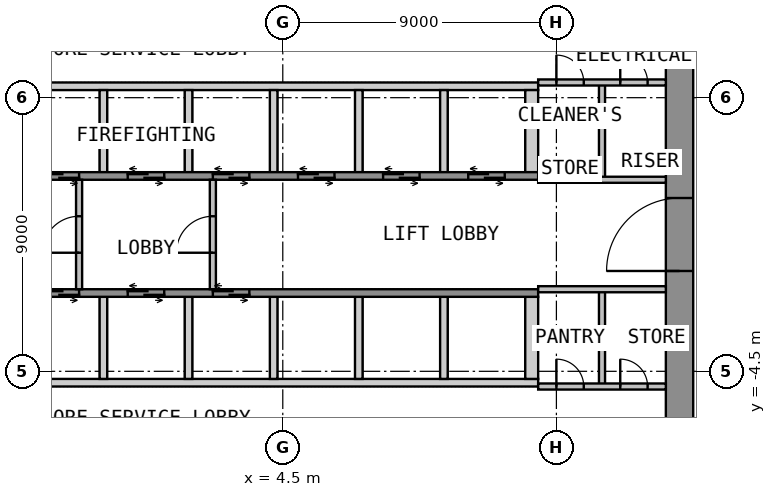
"""IFC4 building model, lengths in metres.
Left out: names, types, materials, properties, quantities, classifications, styles, units other than length and angle.
Written with IfcOpenShell. Run it as: python <this file> out.ifc"""

import sys

from ifc_helpers import new_model, si_unit, direction, frame, frame_2d, origin, place, context, subcontext, project, spatial, polyline, rectangle, outline, extrude, element, fill, save


model = new_model("IFC4")
c1 = context("Model", 3, precision=1e-05, world=origin(), true_north=direction((0.0, 1.0)))
c2 = subcontext(c1, "Body", "Model", "MODEL_VIEW")
j1 = project(units=[si_unit("LENGTHUNIT", "METRE"), si_unit("PLANEANGLEUNIT", "RADIAN")], contexts=[c1])
p1 = place(None, origin())
s1 = spatial("IfcSite", under=j1, at=p1, CompositionType="ELEMENT")
p2 = place(p1, origin())
s2 = spatial("IfcBuilding", under=s1, at=p2, CompositionType="ELEMENT")
p3 = place(p2, frame((0.0, 0.0, 6.0)))
s3 = spatial("IfcBuildingStorey", under=s2, at=p3, CompositionType="ELEMENT", Elevation=6.0)
p4 = place(p3, frame((17.55, -12.6, 0.0), z_axis=(0.0, 0.0, 1.0), x_axis=(0.0, 1.0, 0.0)))
e1 = element("IfcWall", 1, at=p4, inside=s3, PredefinedType="SHEAR", context=c2, shape_type="SweptSolid", body=[
    extrude(rectangle(XDim=25.2, YDim=0.9, at=frame_2d((12.6, 0.0))), origin(), (0.0, 0.0, 1.0), 4.4),
])
p5 = place(p4, frame((11.4, 0.0, 0.0)))
e2 = element("IfcOpeningElement", 2, at=p5, cuts=e1, PredefinedType="OPENING", context=c2, shape_type="SweptSolid", body=[
    extrude(rectangle(XDim=2.4, YDim=2.1, at=frame_2d((1.2, 1.05))), frame((0.0, 0.46, 0.0), z_axis=(0.0, -1.0, 0.0), x_axis=(1.0, 0.0, 0.0)), (0.0, 0.0, 1.0), 0.92),
])
p6 = place(p3, origin())
e3 = element("IfcWall", 3, at=p6, inside=s3, PredefinedType="SHEAR", context=c2, shape_type="SweptSolid", body=[
    extrude(outline(polyline([(-12.9, 4.75), (12.9, 4.75), (12.9, 5.0), (-12.9, 5.0), (-12.9, 4.75)])), origin(), (0.0, 0.0, 1.0), 4.4),
])
p7 = place(p3, origin())
e4 = element("IfcWall", 4, at=p7, inside=s3, PredefinedType="SHEAR", context=c2, shape_type="SweptSolid", body=[
    extrude(outline(polyline([(-1.525, 2.05), (-1.275, 2.05), (-1.275, 4.75), (-1.525, 4.75), (-1.525, 2.05)])), origin(), (0.0, 0.0, 1.0), 4.4),
])
p8 = place(p3, origin())
e5 = element("IfcWall", 5, at=p8, inside=s3, PredefinedType="SHEAR", context=c2, shape_type="SweptSolid", body=[
    extrude(outline(polyline([(1.275, 2.05), (1.525, 2.05), (1.525, 4.75), (1.275, 4.75), (1.275, 2.05)])), origin(), (0.0, 0.0, 1.0), 4.4),
])
p9 = place(p3, origin())
e6 = element("IfcWall", 6, at=p9, inside=s3, PredefinedType="SHEAR", context=c2, shape_type="SweptSolid", body=[
    extrude(outline(polyline([(4.075, 2.05), (4.325, 2.05), (4.325, 4.75), (4.075, 4.75), (4.075, 2.05)])), origin(), (0.0, 0.0, 1.0), 4.4),
])
p10 = place(p3, origin())
e7 = element("IfcWall", 7, at=p10, inside=s3, PredefinedType="SHEAR", context=c2, shape_type="SweptSolid", body=[
    extrude(outline(polyline([(6.875, 2.05), (7.125, 2.05), (7.125, 4.75), (6.875, 4.75), (6.875, 2.05)])), origin(), (0.0, 0.0, 1.0), 4.4),
])
p11 = place(p3, origin())
e8 = element("IfcWall", 8, at=p11, inside=s3, PredefinedType="SHEAR", context=c2, shape_type="SweptSolid", body=[
    extrude(outline(polyline([(9.675, 2.05), (9.925, 2.05), (9.925, 4.75), (9.675, 4.75), (9.675, 2.05)])), origin(), (0.0, 0.0, 1.0), 4.4),
])
p12 = place(p3, origin())
e9 = element("IfcWall", 9, at=p12, inside=s3, PredefinedType="SHEAR", context=c2, shape_type="SweptSolid", body=[
    extrude(outline(polyline([(12.475, 2.05), (12.9, 2.05), (12.9, 4.75), (12.475, 4.75), (12.475, 2.05)])), origin(), (0.0, 0.0, 1.0), 4.4),
])
p13 = place(p3, frame((-12.9, 1.925, 0.0), z_axis=(0.0, 0.0, 1.0), x_axis=(1.0, 0.0, 0.0)))
e10 = element("IfcWall", 10, at=p13, inside=s3, PredefinedType="SHEAR", context=c2, shape_type="SweptSolid", body=[
    extrude(rectangle(XDim=25.8, YDim=0.25, at=frame_2d((12.9, 0.0))), origin(), (0.0, 0.0, 1.0), 4.4),
])
p14 = place(p13, frame((9.5, 0.0, 0.0)))
e11 = element("IfcOpeningElement", 11, at=p14, cuts=e10, PredefinedType="OPENING", context=c2, shape_type="SweptSolid", body=[
    extrude(rectangle(XDim=1.2, YDim=2.1, at=frame_2d((0.6, 1.05))), frame((0.0, 0.135, 0.0), z_axis=(0.0, -1.0, 0.0), x_axis=(1.0, 0.0, 0.0)), (0.0, 0.0, 1.0), 0.27),
])
p15 = place(p13, frame((12.3, 0.0, 0.0)))
e12 = element("IfcOpeningElement", 12, at=p15, cuts=e10, PredefinedType="OPENING", context=c2, shape_type="SweptSolid", body=[
    extrude(rectangle(XDim=1.2, YDim=2.1, at=frame_2d((0.6, 1.05))), frame((0.0, 0.135, 0.0), z_axis=(0.0, -1.0, 0.0), x_axis=(1.0, 0.0, 0.0)), (0.0, 0.0, 1.0), 0.27),
])
p16 = place(p13, frame((15.1, 0.0, 0.0)))
e13 = element("IfcOpeningElement", 13, at=p16, cuts=e10, PredefinedType="OPENING", context=c2, shape_type="SweptSolid", body=[
    extrude(rectangle(XDim=1.2, YDim=2.1, at=frame_2d((0.6, 1.05))), frame((0.0, 0.135, 0.0), z_axis=(0.0, -1.0, 0.0), x_axis=(1.0, 0.0, 0.0)), (0.0, 0.0, 1.0), 0.27),
])
p17 = place(p13, frame((17.9, 0.0, 0.0)))
e14 = element("IfcOpeningElement", 14, at=p17, cuts=e10, PredefinedType="OPENING", context=c2, shape_type="SweptSolid", body=[
    extrude(rectangle(XDim=1.2, YDim=2.1, at=frame_2d((0.6, 1.05))), frame((0.0, 0.135, 0.0), z_axis=(0.0, -1.0, 0.0), x_axis=(1.0, 0.0, 0.0)), (0.0, 0.0, 1.0), 0.27),
])
p18 = place(p13, frame((20.7, 0.0, 0.0)))
e15 = element("IfcOpeningElement", 15, at=p18, cuts=e10, PredefinedType="OPENING", context=c2, shape_type="SweptSolid", body=[
    extrude(rectangle(XDim=1.2, YDim=2.1, at=frame_2d((0.6, 1.05))), frame((0.0, 0.135, 0.0), z_axis=(0.0, -1.0, 0.0), x_axis=(1.0, 0.0, 0.0)), (0.0, 0.0, 1.0), 0.27),
])
p19 = place(p13, frame((23.5, 0.0, 0.0)))
e16 = element("IfcOpeningElement", 16, at=p19, cuts=e10, PredefinedType="OPENING", context=c2, shape_type="SweptSolid", body=[
    extrude(rectangle(XDim=1.2, YDim=2.1, at=frame_2d((0.6, 1.05))), frame((0.0, 0.135, 0.0), z_axis=(0.0, -1.0, 0.0), x_axis=(1.0, 0.0, 0.0)), (0.0, 0.0, 1.0), 0.27),
])
p20 = place(p3, origin())
e17 = element("IfcWall", 17, at=p20, inside=s3, PredefinedType="SHEAR", context=c2, shape_type="SweptSolid", body=[
    extrude(outline(polyline([(-12.9, -5.0), (12.9, -5.0), (12.9, -4.75), (-12.9, -4.75), (-12.9, -5.0)])), origin(), (0.0, 0.0, 1.0), 4.4),
])
p21 = place(p3, origin())
e18 = element("IfcWall", 18, at=p21, inside=s3, PredefinedType="SHEAR", context=c2, shape_type="SweptSolid", body=[
    extrude(outline(polyline([(-1.525, -4.75), (-1.275, -4.75), (-1.275, -2.05), (-1.525, -2.05), (-1.525, -4.75)])), origin(), (0.0, 0.0, 1.0), 4.4),
])
p22 = place(p3, origin())
e19 = element("IfcWall", 19, at=p22, inside=s3, PredefinedType="SHEAR", context=c2, shape_type="SweptSolid", body=[
    extrude(outline(polyline([(1.275, -4.75), (1.525, -4.75), (1.525, -2.05), (1.275, -2.05), (1.275, -4.75)])), origin(), (0.0, 0.0, 1.0), 4.4),
])
p23 = place(p3, origin())
e20 = element("IfcWall", 20, at=p23, inside=s3, PredefinedType="SHEAR", context=c2, shape_type="SweptSolid", body=[
    extrude(outline(polyline([(4.075, -4.75), (4.325, -4.75), (4.325, -2.05), (4.075, -2.05), (4.075, -4.75)])), origin(), (0.0, 0.0, 1.0), 4.4),
])
p24 = place(p3, origin())
e21 = element("IfcWall", 21, at=p24, inside=s3, PredefinedType="SHEAR", context=c2, shape_type="SweptSolid", body=[
    extrude(outline(polyline([(6.875, -4.75), (7.125, -4.75), (7.125, -2.05), (6.875, -2.05), (6.875, -4.75)])), origin(), (0.0, 0.0, 1.0), 4.4),
])
p25 = place(p3, origin())
e22 = element("IfcWall", 22, at=p25, inside=s3, PredefinedType="SHEAR", context=c2, shape_type="SweptSolid", body=[
    extrude(outline(polyline([(9.675, -4.75), (9.925, -4.75), (9.925, -2.05), (9.675, -2.05), (9.675, -4.75)])), origin(), (0.0, 0.0, 1.0), 4.4),
])
p26 = place(p3, origin())
e23 = element("IfcWall", 23, at=p26, inside=s3, PredefinedType="SHEAR", context=c2, shape_type="SweptSolid", body=[
    extrude(outline(polyline([(12.475, -4.75), (12.9, -4.75), (12.9, -2.05), (12.475, -2.05), (12.475, -4.75)])), origin(), (0.0, 0.0, 1.0), 4.4),
])
p27 = place(p3, frame((-12.9, -1.925, 0.0), z_axis=(0.0, 0.0, 1.0), x_axis=(1.0, 0.0, 0.0)))
e24 = element("IfcWall", 24, at=p27, inside=s3, PredefinedType="SHEAR", context=c2, shape_type="SweptSolid", body=[
    extrude(rectangle(XDim=25.8, YDim=0.25, at=frame_2d((12.9, 0.0))), origin(), (0.0, 0.0, 1.0), 4.4),
])
p28 = place(p27, frame((1.1, 0.0, 0.0)))
e25 = element("IfcOpeningElement", 25, at=p28, cuts=e24, PredefinedType="OPENING", context=c2, shape_type="SweptSolid", body=[
    extrude(rectangle(XDim=1.2, YDim=2.1, at=frame_2d((0.6, 1.05))), frame((0.0, 0.135, 0.0), z_axis=(0.0, -1.0, 0.0), x_axis=(1.0, 0.0, 0.0)), (0.0, 0.0, 1.0), 0.27),
])
p29 = place(p27, frame((3.9, 0.0, 0.0)))
e26 = element("IfcOpeningElement", 26, at=p29, cuts=e24, PredefinedType="OPENING", context=c2, shape_type="SweptSolid", body=[
    extrude(rectangle(XDim=1.2, YDim=2.1, at=frame_2d((0.6, 1.05))), frame((0.0, 0.135, 0.0), z_axis=(0.0, -1.0, 0.0), x_axis=(1.0, 0.0, 0.0)), (0.0, 0.0, 1.0), 0.27),
])
p30 = place(p27, frame((6.7, 0.0, 0.0)))
e27 = element("IfcOpeningElement", 27, at=p30, cuts=e24, PredefinedType="OPENING", context=c2, shape_type="SweptSolid", body=[
    extrude(rectangle(XDim=1.2, YDim=2.1, at=frame_2d((0.6, 1.05))), frame((0.0, 0.135, 0.0), z_axis=(0.0, -1.0, 0.0), x_axis=(1.0, 0.0, 0.0)), (0.0, 0.0, 1.0), 0.27),
])
p31 = place(p27, frame((9.5, 0.0, 0.0)))
e28 = element("IfcOpeningElement", 28, at=p31, cuts=e24, PredefinedType="OPENING", context=c2, shape_type="SweptSolid", body=[
    extrude(rectangle(XDim=1.2, YDim=2.1, at=frame_2d((0.6, 1.05))), frame((0.0, 0.135, 0.0), z_axis=(0.0, -1.0, 0.0), x_axis=(1.0, 0.0, 0.0)), (0.0, 0.0, 1.0), 0.27),
])
p32 = place(p27, frame((12.3, 0.0, 0.0)))
e29 = element("IfcOpeningElement", 29, at=p32, cuts=e24, PredefinedType="OPENING", context=c2, shape_type="SweptSolid", body=[
    extrude(rectangle(XDim=1.2, YDim=2.1, at=frame_2d((0.6, 1.05))), frame((0.0, 0.135, 0.0), z_axis=(0.0, -1.0, 0.0), x_axis=(1.0, 0.0, 0.0)), (0.0, 0.0, 1.0), 0.27),
])
p33 = place(p27, frame((15.1, 0.0, 0.0)))
e30 = element("IfcOpeningElement", 30, at=p33, cuts=e24, PredefinedType="OPENING", context=c2, shape_type="SweptSolid", body=[
    extrude(rectangle(XDim=1.2, YDim=2.1, at=frame_2d((0.6, 1.05))), frame((0.0, 0.135, 0.0), z_axis=(0.0, -1.0, 0.0), x_axis=(1.0, 0.0, 0.0)), (0.0, 0.0, 1.0), 0.27),
])
p34 = place(p3, frame((-2.2, -1.8, 0.0), z_axis=(0.0, 0.0, 1.0), x_axis=(0.0, 1.0, 0.0)))
e31 = element("IfcWall", 31, at=p34, inside=s3, PredefinedType="PARTITIONING", context=c2, shape_type="SweptSolid", body=[
    extrude(rectangle(XDim=3.6, YDim=0.2, at=frame_2d((1.8, 0.0))), origin(), (0.0, 0.0, 1.0), 4.4),
])
p35 = place(p34, frame((1.2, 0.0, 0.0)))
e32 = element("IfcOpeningElement", 32, at=p35, cuts=e31, PredefinedType="OPENING", context=c2, shape_type="SweptSolid", body=[
    extrude(rectangle(XDim=1.2, YDim=2.1, at=frame_2d((0.6, 1.05))), frame((0.0, 0.11, 0.0), z_axis=(0.0, -1.0, 0.0), x_axis=(1.0, 0.0, 0.0)), (0.0, 0.0, 1.0), 0.22),
])
p36 = place(p3, frame((2.2, -1.8, 0.0), z_axis=(0.0, 0.0, 1.0), x_axis=(0.0, 1.0, 0.0)))
e33 = element("IfcWall", 33, at=p36, inside=s3, PredefinedType="PARTITIONING", context=c2, shape_type="SweptSolid", body=[
    extrude(rectangle(XDim=3.6, YDim=0.2, at=frame_2d((1.8, 0.0))), origin(), (0.0, 0.0, 1.0), 4.4),
])
p37 = place(p36, frame((1.2, 0.0, 0.0)))
e34 = element("IfcOpeningElement", 34, at=p37, cuts=e33, PredefinedType="OPENING", context=c2, shape_type="SweptSolid", body=[
    extrude(rectangle(XDim=1.2, YDim=2.1, at=frame_2d((0.6, 1.05))), frame((0.0, 0.11, 0.0), z_axis=(0.0, -1.0, 0.0), x_axis=(1.0, 0.0, 0.0)), (0.0, 0.0, 1.0), 0.22),
])
p38 = place(p3, frame((15.0, 1.8, 0.0), z_axis=(0.0, 0.0, 1.0), x_axis=(0.0, 1.0, 0.0)))
e35 = element("IfcWall", 35, at=p38, inside=s3, PredefinedType="PARTITIONING", context=c2, shape_type="SweptSolid", body=[
    extrude(rectangle(XDim=3.2, YDim=0.2, at=frame_2d((1.6, 0.0))), origin(), (0.0, 0.0, 1.0), 4.4),
])
p39 = place(p3, frame((12.9, 5.0, 0.0), z_axis=(0.0, 0.0, 1.0), x_axis=(1.0, 0.0, 0.0)))
e36 = element("IfcWall", 36, at=p39, inside=s3, PredefinedType="PARTITIONING", context=c2, shape_type="SweptSolid", body=[
    extrude(rectangle(XDim=4.2, YDim=0.2, at=frame_2d((2.1, 0.0))), origin(), (0.0, 0.0, 1.0), 4.4),
])
p40 = place(p39, frame((0.6, 0.0, 0.0)))
e37 = element("IfcOpeningElement", 37, at=p40, cuts=e36, PredefinedType="OPENING", context=c2, shape_type="SweptSolid", body=[
    extrude(rectangle(XDim=0.9, YDim=2.1, at=frame_2d((0.45, 1.05))), frame((0.0, 0.11, 0.0), z_axis=(0.0, -1.0, 0.0), x_axis=(1.0, 0.0, 0.0)), (0.0, 0.0, 1.0), 0.22),
])
p41 = place(p39, frame((2.7, 0.0, 0.0)))
e38 = element("IfcOpeningElement", 38, at=p41, cuts=e36, PredefinedType="OPENING", context=c2, shape_type="SweptSolid", body=[
    extrude(rectangle(XDim=0.9, YDim=2.1, at=frame_2d((0.45, 1.05))), frame((0.0, 0.11, 0.0), z_axis=(0.0, -1.0, 0.0), x_axis=(1.0, 0.0, 0.0)), (0.0, 0.0, 1.0), 0.22),
])
p42 = place(p3, frame((12.9, 1.8, 0.0), z_axis=(0.0, 0.0, 1.0), x_axis=(1.0, 0.0, 0.0)))
e39 = element("IfcWall", 39, at=p42, inside=s3, PredefinedType="PARTITIONING", context=c2, shape_type="SweptSolid", body=[
    extrude(rectangle(XDim=4.2, YDim=0.2, at=frame_2d((2.1, 0.0))), origin(), (0.0, 0.0, 1.0), 4.4),
])
p43 = place(p3, frame((15.0, -5.0, 0.0), z_axis=(0.0, 0.0, 1.0), x_axis=(0.0, 1.0, 0.0)))
e40 = element("IfcWall", 40, at=p43, inside=s3, PredefinedType="PARTITIONING", context=c2, shape_type="SweptSolid", body=[
    extrude(rectangle(XDim=3.2, YDim=0.2, at=frame_2d((1.6, 0.0))), origin(), (0.0, 0.0, 1.0), 4.4),
])
p44 = place(p3, frame((12.9, -5.0, 0.0), z_axis=(0.0, 0.0, 1.0), x_axis=(1.0, 0.0, 0.0)))
e41 = element("IfcWall", 41, at=p44, inside=s3, PredefinedType="PARTITIONING", context=c2, shape_type="SweptSolid", body=[
    extrude(rectangle(XDim=4.2, YDim=0.2, at=frame_2d((2.1, 0.0))), origin(), (0.0, 0.0, 1.0), 4.4),
])
p45 = place(p44, frame((0.6, 0.0, 0.0)))
e42 = element("IfcOpeningElement", 42, at=p45, cuts=e41, PredefinedType="OPENING", context=c2, shape_type="SweptSolid", body=[
    extrude(rectangle(XDim=0.9, YDim=2.1, at=frame_2d((0.45, 1.05))), frame((0.0, 0.11, 0.0), z_axis=(0.0, -1.0, 0.0), x_axis=(1.0, 0.0, 0.0)), (0.0, 0.0, 1.0), 0.22),
])
p46 = place(p44, frame((2.7, 0.0, 0.0)))
e43 = element("IfcOpeningElement", 43, at=p46, cuts=e41, PredefinedType="OPENING", context=c2, shape_type="SweptSolid", body=[
    extrude(rectangle(XDim=0.9, YDim=2.1, at=frame_2d((0.45, 1.05))), frame((0.0, 0.11, 0.0), z_axis=(0.0, -1.0, 0.0), x_axis=(1.0, 0.0, 0.0)), (0.0, 0.0, 1.0), 0.22),
])
p47 = place(p3, frame((12.9, -1.8, 0.0), z_axis=(0.0, 0.0, 1.0), x_axis=(1.0, 0.0, 0.0)))
e44 = element("IfcWall", 44, at=p47, inside=s3, PredefinedType="PARTITIONING", context=c2, shape_type="SweptSolid", body=[
    extrude(rectangle(XDim=4.2, YDim=0.2, at=frame_2d((2.1, 0.0))), origin(), (0.0, 0.0, 1.0), 4.4),
])
p48 = place(p5, origin())
e45 = element("IfcDoor", 45, at=p48, inside=s3, OperationType="DOUBLE_DOOR_DOUBLE_SWING", PredefinedType="DOOR", context=c2, shape_type="SweptSolid", body=[
    extrude(rectangle(XDim=2.4, YDim=2.1, at=frame_2d((1.2, 1.05))), frame((0.0, 0.025, 0.0), z_axis=(0.0, -1.0, 0.0), x_axis=(1.0, 0.0, 0.0)), (0.0, 0.0, 1.0), 0.05),
])
fill(e2, e45)
p49 = place(p14, origin())
e46 = element("IfcDoor", 46, at=p49, inside=s3, OperationType="DOUBLE_DOOR_SLIDING", PredefinedType="DOOR", context=c2, shape_type="SweptSolid", body=[
    extrude(rectangle(XDim=1.2, YDim=2.1, at=frame_2d((0.6, 1.05))), frame((0.0, 0.025, 0.0), z_axis=(0.0, -1.0, 0.0), x_axis=(1.0, 0.0, 0.0)), (0.0, 0.0, 1.0), 0.05),
])
fill(e11, e46)
p50 = place(p15, origin())
e47 = element("IfcDoor", 47, at=p50, inside=s3, OperationType="DOUBLE_DOOR_SLIDING", PredefinedType="DOOR", context=c2, shape_type="SweptSolid", body=[
    extrude(rectangle(XDim=1.2, YDim=2.1, at=frame_2d((0.6, 1.05))), frame((0.0, 0.025, 0.0), z_axis=(0.0, -1.0, 0.0), x_axis=(1.0, 0.0, 0.0)), (0.0, 0.0, 1.0), 0.05),
])
fill(e12, e47)
p51 = place(p16, origin())
e48 = element("IfcDoor", 48, at=p51, inside=s3, OperationType="DOUBLE_DOOR_SLIDING", PredefinedType="DOOR", context=c2, shape_type="SweptSolid", body=[
    extrude(rectangle(XDim=1.2, YDim=2.1, at=frame_2d((0.6, 1.05))), frame((0.0, 0.025, 0.0), z_axis=(0.0, -1.0, 0.0), x_axis=(1.0, 0.0, 0.0)), (0.0, 0.0, 1.0), 0.05),
])
fill(e13, e48)
p52 = place(p17, origin())
e49 = element("IfcDoor", 49, at=p52, inside=s3, OperationType="DOUBLE_DOOR_SLIDING", PredefinedType="DOOR", context=c2, shape_type="SweptSolid", body=[
    extrude(rectangle(XDim=1.2, YDim=2.1, at=frame_2d((0.6, 1.05))), frame((0.0, 0.025, 0.0), z_axis=(0.0, -1.0, 0.0), x_axis=(1.0, 0.0, 0.0)), (0.0, 0.0, 1.0), 0.05),
])
fill(e14, e49)
p53 = place(p18, origin())
e50 = element("IfcDoor", 50, at=p53, inside=s3, OperationType="DOUBLE_DOOR_SLIDING", PredefinedType="DOOR", context=c2, shape_type="SweptSolid", body=[
    extrude(rectangle(XDim=1.2, YDim=2.1, at=frame_2d((0.6, 1.05))), frame((0.0, 0.025, 0.0), z_axis=(0.0, -1.0, 0.0), x_axis=(1.0, 0.0, 0.0)), (0.0, 0.0, 1.0), 0.05),
])
fill(e15, e50)
p54 = place(p19, origin())
e51 = element("IfcDoor", 51, at=p54, inside=s3, OperationType="DOUBLE_DOOR_SLIDING", PredefinedType="DOOR", context=c2, shape_type="SweptSolid", body=[
    extrude(rectangle(XDim=1.2, YDim=2.1, at=frame_2d((0.6, 1.05))), frame((0.0, 0.025, 0.0), z_axis=(0.0, -1.0, 0.0), x_axis=(1.0, 0.0, 0.0)), (0.0, 0.0, 1.0), 0.05),
])
fill(e16, e51)
p55 = place(p31, origin())
e52 = element("IfcDoor", 52, at=p55, inside=s3, OperationType="DOUBLE_DOOR_SLIDING", PredefinedType="DOOR", context=c2, shape_type="SweptSolid", body=[
    extrude(rectangle(XDim=1.2, YDim=2.1, at=frame_2d((0.6, 1.05))), frame((0.0, 0.025, 0.0), z_axis=(0.0, -1.0, 0.0), x_axis=(1.0, 0.0, 0.0)), (0.0, 0.0, 1.0), 0.05),
])
fill(e28, e52)
p56 = place(p32, origin())
e53 = element("IfcDoor", 53, at=p56, inside=s3, OperationType="DOUBLE_DOOR_SLIDING", PredefinedType="DOOR", context=c2, shape_type="SweptSolid", body=[
    extrude(rectangle(XDim=1.2, YDim=2.1, at=frame_2d((0.6, 1.05))), frame((0.0, 0.025, 0.0), z_axis=(0.0, -1.0, 0.0), x_axis=(1.0, 0.0, 0.0)), (0.0, 0.0, 1.0), 0.05),
])
fill(e29, e53)
p57 = place(p33, origin())
e54 = element("IfcDoor", 54, at=p57, inside=s3, OperationType="DOUBLE_DOOR_SLIDING", PredefinedType="DOOR", context=c2, shape_type="SweptSolid", body=[
    extrude(rectangle(XDim=1.2, YDim=2.1, at=frame_2d((0.6, 1.05))), frame((0.0, 0.025, 0.0), z_axis=(0.0, -1.0, 0.0), x_axis=(1.0, 0.0, 0.0)), (0.0, 0.0, 1.0), 0.05),
])
fill(e30, e54)
p58 = place(p35, origin())
e55 = element("IfcDoor", 55, at=p58, inside=s3, OperationType="SINGLE_SWING_LEFT", PredefinedType="DOOR", context=c2, shape_type="SweptSolid", body=[
    extrude(rectangle(XDim=1.2, YDim=2.1, at=frame_2d((0.6, 1.05))), frame((0.0, 0.025, 0.0), z_axis=(0.0, -1.0, 0.0), x_axis=(1.0, 0.0, 0.0)), (0.0, 0.0, 1.0), 0.05),
])
fill(e32, e55)
p59 = place(p37, origin())
e56 = element("IfcDoor", 56, at=p59, inside=s3, OperationType="SINGLE_SWING_LEFT", PredefinedType="DOOR", context=c2, shape_type="SweptSolid", body=[
    extrude(rectangle(XDim=1.2, YDim=2.1, at=frame_2d((0.6, 1.05))), frame((0.0, 0.025, 0.0), z_axis=(0.0, -1.0, 0.0), x_axis=(1.0, 0.0, 0.0)), (0.0, 0.0, 1.0), 0.05),
])
fill(e34, e56)
p60 = place(p40, origin())
e57 = element("IfcDoor", 57, at=p60, inside=s3, OperationType="SINGLE_SWING_LEFT", PredefinedType="DOOR", context=c2, shape_type="SweptSolid", body=[
    extrude(rectangle(XDim=0.9, YDim=2.1, at=frame_2d((0.45, 1.05))), frame((0.0, 0.025, 0.0), z_axis=(0.0, -1.0, 0.0), x_axis=(1.0, 0.0, 0.0)), (0.0, 0.0, 1.0), 0.05),
])
fill(e37, e57)
p61 = place(p41, origin())
e58 = element("IfcDoor", 58, at=p61, inside=s3, OperationType="SINGLE_SWING_LEFT", PredefinedType="DOOR", context=c2, shape_type="SweptSolid", body=[
    extrude(rectangle(XDim=0.9, YDim=2.1, at=frame_2d((0.45, 1.05))), frame((0.0, 0.025, 0.0), z_axis=(0.0, -1.0, 0.0), x_axis=(1.0, 0.0, 0.0)), (0.0, 0.0, 1.0), 0.05),
])
fill(e38, e58)
p62 = place(p45, origin())
e59 = element("IfcDoor", 59, at=p62, inside=s3, OperationType="SINGLE_SWING_LEFT", PredefinedType="DOOR", context=c2, shape_type="SweptSolid", body=[
    extrude(rectangle(XDim=0.9, YDim=2.1, at=frame_2d((0.45, 1.05))), frame((0.0, 0.025, 0.0), z_axis=(0.0, -1.0, 0.0), x_axis=(1.0, 0.0, 0.0)), (0.0, 0.0, 1.0), 0.05),
])
fill(e42, e59)
p63 = place(p46, origin())
e60 = element("IfcDoor", 60, at=p63, inside=s3, OperationType="SINGLE_SWING_LEFT", PredefinedType="DOOR", context=c2, shape_type="SweptSolid", body=[
    extrude(rectangle(XDim=0.9, YDim=2.1, at=frame_2d((0.45, 1.05))), frame((0.0, 0.025, 0.0), z_axis=(0.0, -1.0, 0.0), x_axis=(1.0, 0.0, 0.0)), (0.0, 0.0, 1.0), 0.05),
])
fill(e43, e60)
save(model, sys.argv[1])
